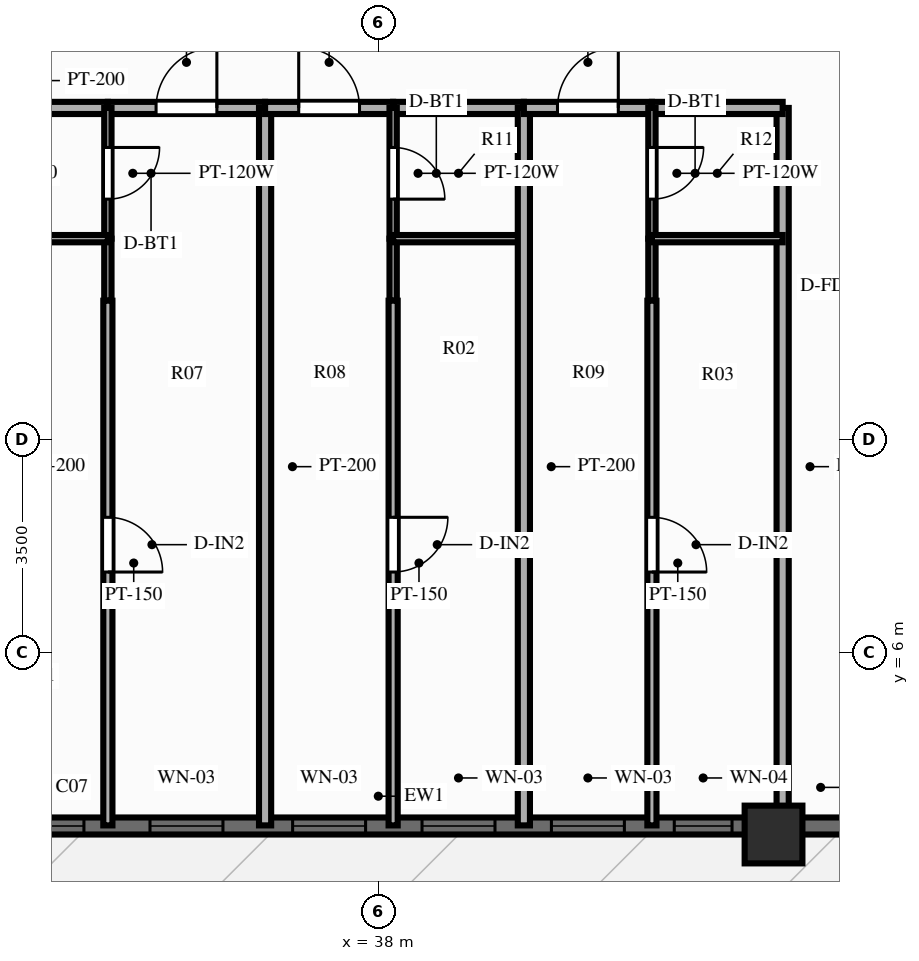
"""IFC4 building model, lengths in metres.
Left out: names, types, materials, properties, quantities, classifications, styles, units other than length and angle.
Written with IfcOpenShell. Run it as: python <this file> out.ifc"""

import sys

from ifc_helpers import new_model, si_unit, direction, frame, frame_2d, origin, origin_2d, place, context, subcontext, project, spatial, rectangle, extrude, source, transform, mapped, element, fill, save


model = new_model("IFC4")
c1 = context("Model", 3, precision=1e-05, world=origin(), true_north=direction((0.0, 1.0)))
c2 = subcontext(c1, "Body", "Model", "MODEL_VIEW")
j1 = project(units=[si_unit("LENGTHUNIT", "METRE"), si_unit("PLANEANGLEUNIT", "RADIAN")], contexts=[c1])
p1 = place(None, origin())
s1 = spatial("IfcSite", under=j1, at=p1, CompositionType="ELEMENT")
p2 = place(p1, origin())
s2 = spatial("IfcBuilding", under=s1, at=p2, CompositionType="ELEMENT")
p3 = place(p2, frame((0.0, 0.0, 110.85)))
s3 = spatial("IfcBuildingStorey", under=s2, at=p3, CompositionType="ELEMENT", Elevation=110.85)
m1 = source(origin(), c2, "Body", "SweptSolid", [
    extrude(rectangle(XDim=0.95, YDim=0.95, at=origin_2d()), origin(), (0.0, 0.0, 1.0), 3.0),
])
p4 = place(p3, frame((44.5, 3.0, 0.0), z_axis=(0.0, 0.0, 1.0), x_axis=(1.0, 0.0, 0.0)))
e1 = element("IfcColumn", 1, at=p4, inside=s3, PredefinedType="COLUMN", context=c2, shape_type="MappedRepresentation", body=[
    mapped(m1, transform((0.0, 0.0, 0.0), scale=1.0)),
])
p5 = place(p3, frame((16.2, 3.14, 0.0), z_axis=(0.0, 0.0, 1.0), x_axis=(1.0, 0.0, 0.0)))
e2 = element("IfcWall", 2, at=p5, inside=s3, PredefinedType="SOLIDWALL", context=c2, shape_type="SweptSolid", body=[
    extrude(rectangle(XDim=43.6, YDim=0.28, at=frame_2d((21.8, 0.0))), origin(), (0.0, 0.0, 1.0), 2.28),
])
p6 = place(p5, frame((8.2, 0.0, 0.0), z_axis=(0.0, 0.0, 1.0), x_axis=(-1.0, 0.0, 0.0)))
e3 = element("IfcOpeningElement", 3, at=p6, cuts=e2, PredefinedType="OPENING", context=c2, shape_type="SweptSolid", body=[
    extrude(rectangle(XDim=1.1, YDim=2.15, at=frame_2d((0.55, 1.075))), frame((0.0, 0.152, 0.0), z_axis=(0.0, -1.0, 0.0), x_axis=(1.0, 0.0, 0.0)), (0.0, 0.0, 1.0), 0.304),
])
p7 = place(p5, frame((16.009, 0.0, 0.25)))
e4 = element("IfcOpeningElement", 4, at=p7, cuts=e2, PredefinedType="OPENING", context=c2, shape_type="SweptSolid", body=[
    extrude(rectangle(XDim=0.95, YDim=1.5, at=frame_2d((0.475, 0.75))), frame((0.0, 0.152, 0.0), z_axis=(0.0, -1.0, 0.0), x_axis=(1.0, 0.0, 0.0)), (0.0, 0.0, 1.0), 0.304),
])
p8 = place(p5, frame((18.045, 0.0, 0.25)))
e5 = element("IfcOpeningElement", 5, at=p8, cuts=e2, PredefinedType="OPENING", context=c2, shape_type="SweptSolid", body=[
    extrude(rectangle(XDim=1.2, YDim=1.5, at=frame_2d((0.6, 0.75))), frame((0.0, 0.152, 0.0), z_axis=(0.0, -1.0, 0.0), x_axis=(1.0, 0.0, 0.0)), (0.0, 0.0, 1.0), 0.304),
])
p9 = place(p5, frame((20.391, 0.0, 0.25)))
e6 = element("IfcOpeningElement", 6, at=p9, cuts=e2, PredefinedType="OPENING", context=c2, shape_type="SweptSolid", body=[
    extrude(rectangle(XDim=1.2, YDim=1.5, at=frame_2d((0.6, 0.75))), frame((0.0, 0.152, 0.0), z_axis=(0.0, -1.0, 0.0), x_axis=(1.0, 0.0, 0.0)), (0.0, 0.0, 1.0), 0.304),
])
p10 = place(p5, frame((22.519, 0.0, 0.25)))
e7 = element("IfcOpeningElement", 7, at=p10, cuts=e2, PredefinedType="OPENING", context=c2, shape_type="SweptSolid", body=[
    extrude(rectangle(XDim=1.2, YDim=1.5, at=frame_2d((0.6, 0.75))), frame((0.0, 0.152, 0.0), z_axis=(0.0, -1.0, 0.0), x_axis=(1.0, 0.0, 0.0)), (0.0, 0.0, 1.0), 0.304),
])
p11 = place(p5, frame((24.647, 0.0, 0.25)))
e8 = element("IfcOpeningElement", 8, at=p11, cuts=e2, PredefinedType="OPENING", context=c2, shape_type="SweptSolid", body=[
    extrude(rectangle(XDim=1.2, YDim=1.5, at=frame_2d((0.6, 0.75))), frame((0.0, 0.152, 0.0), z_axis=(0.0, -1.0, 0.0), x_axis=(1.0, 0.0, 0.0)), (0.0, 0.0, 1.0), 0.304),
])
p12 = place(p5, frame((26.667, 0.0, 0.25)))
e9 = element("IfcOpeningElement", 9, at=p12, cuts=e2, PredefinedType="OPENING", context=c2, shape_type="SweptSolid", body=[
    extrude(rectangle(XDim=0.95, YDim=1.5, at=frame_2d((0.475, 0.75))), frame((0.0, 0.152, 0.0), z_axis=(0.0, -1.0, 0.0), x_axis=(1.0, 0.0, 0.0)), (0.0, 0.0, 1.0), 0.304),
])
p13 = place(p5, frame((35.35, 0.0, 0.25)))
e10 = element("IfcOpeningElement", 10, at=p13, cuts=e2, PredefinedType="OPENING", context=c2, shape_type="SweptSolid", body=[
    extrude(rectangle(XDim=1.2, YDim=1.5, at=frame_2d((0.6, 0.75))), frame((0.0, 0.152, 0.0), z_axis=(0.0, -1.0, 0.0), x_axis=(1.0, 0.0, 0.0)), (0.0, 0.0, 1.0), 0.304),
])
p14 = place(p3, frame((44.65, 14.95, 0.0), z_axis=(0.0, 0.0, 1.0), x_axis=(0.0, -1.0, 0.0)))
e11 = element("IfcWall", 11, at=p14, inside=s3, PredefinedType="PARTITIONING", context=c2, shape_type="SweptSolid", body=[
    extrude(rectangle(XDim=11.8, YDim=0.2, at=frame_2d((5.9, 0.0))), origin(), (0.0, 0.0, 1.0), 2.34),
])
p15 = place(p3, frame((31.35, 14.95, 0.0), z_axis=(0.0, 0.0, 1.0), x_axis=(1.0, 0.0, 0.0)))
e12 = element("IfcWall", 12, at=p15, inside=s3, PredefinedType="PARTITIONING", context=c2, shape_type="SweptSolid", body=[
    extrude(rectangle(XDim=2.202, YDim=0.2, at=frame_2d((1.101, 0.0))), origin(), (0.0, 0.0, 1.0), 2.79),
])
p16 = place(p3, frame((33.552, 14.95, 0.0), z_axis=(0.0, 0.0, 1.0), x_axis=(1.0, 0.0, 0.0)))
e13 = element("IfcWall", 13, at=p16, inside=s3, PredefinedType="PARTITIONING", context=c2, shape_type="SweptSolid", body=[
    extrude(rectangle(XDim=2.585, YDim=0.2, at=frame_2d((1.293, 0.0))), origin(), (0.0, 0.0, 1.0), 2.79),
])
p17 = place(p16, frame((0.793, 0.0, 0.0)))
e14 = element("IfcOpeningElement", 14, at=p17, cuts=e13, PredefinedType="OPENING", context=c2, shape_type="SweptSolid", body=[
    extrude(rectangle(XDim=1.0, YDim=2.15, at=frame_2d((0.5, 1.075))), frame((0.0, 0.112, 0.0), z_axis=(0.0, -1.0, 0.0), x_axis=(1.0, 0.0, 0.0)), (0.0, 0.0, 1.0), 0.224),
])
p18 = place(p3, frame((33.552, 14.95, 0.0), z_axis=(0.0, 0.0, 1.0), x_axis=(0.0, -1.0, 0.0)))
e15 = element("IfcWall", 15, at=p18, inside=s3, PredefinedType="PARTITIONING", context=c2, shape_type="SweptSolid", body=[
    extrude(rectangle(XDim=2.15, YDim=0.12, at=frame_2d((1.075, 0.0))), origin(), (0.0, 0.0, 1.0), 2.79),
])
p19 = place(p18, frame((0.65, 0.0, 0.0)))
e16 = element("IfcOpeningElement", 16, at=p19, cuts=e15, PredefinedType="OPENING", context=c2, shape_type="SweptSolid", body=[
    extrude(rectangle(XDim=0.85, YDim=2.05, at=frame_2d((0.425, 1.025))), frame((0.0, 0.072, 0.0), z_axis=(0.0, -1.0, 0.0), x_axis=(1.0, 0.0, 0.0)), (0.0, 0.0, 1.0), 0.144),
])
p20 = place(p3, frame((33.552, 12.8, 0.0), z_axis=(0.0, 0.0, 1.0), x_axis=(0.0, -1.0, 0.0)))
e17 = element("IfcWall", 17, at=p20, inside=s3, PredefinedType="PARTITIONING", context=c2, shape_type="SweptSolid", body=[
    extrude(rectangle(XDim=1.02, YDim=0.12, at=frame_2d((0.51, 0.0))), origin(), (0.0, 0.0, 1.0), 2.79),
])
p21 = place(p3, frame((31.35, 12.8, 0.0), z_axis=(0.0, 0.0, 1.0), x_axis=(1.0, 0.0, 0.0)))
e18 = element("IfcWall", 18, at=p21, inside=s3, PredefinedType="PARTITIONING", context=c2, shape_type="SweptSolid", body=[
    extrude(rectangle(XDim=2.202, YDim=0.12, at=frame_2d((1.101, 0.0))), origin(), (0.0, 0.0, 1.0), 2.79),
])
p22 = place(p3, frame((33.552, 11.78, 0.0), z_axis=(0.0, 0.0, 1.0), x_axis=(0.0, -1.0, 0.0)))
e19 = element("IfcWall", 19, at=p22, inside=s3, PredefinedType="PARTITIONING", context=c2, shape_type="SweptSolid", body=[
    extrude(rectangle(XDim=8.63, YDim=0.15, at=frame_2d((4.315, 0.0))), origin(), (0.0, 0.0, 1.0), 2.79),
])
p23 = place(p22, frame((3.563, 0.0, 0.0)))
e20 = element("IfcOpeningElement", 20, at=p23, cuts=e19, PredefinedType="OPENING", context=c2, shape_type="SweptSolid", body=[
    extrude(rectangle(XDim=0.9, YDim=2.1, at=frame_2d((0.45, 1.05))), frame((0.0, 0.087, 0.0), z_axis=(0.0, -1.0, 0.0), x_axis=(1.0, 0.0, 0.0)), (0.0, 0.0, 1.0), 0.174),
])
p24 = place(p3, frame((36.138, 14.95, 0.0), z_axis=(0.0, 0.0, 1.0), x_axis=(0.0, -1.0, 0.0)))
e21 = element("IfcWall", 21, at=p24, inside=s3, PredefinedType="PARTITIONING", context=c2, shape_type="SweptSolid", body=[
    extrude(rectangle(XDim=11.8, YDim=0.2, at=frame_2d((5.9, 0.0))), origin(), (0.0, 0.0, 1.0), 2.79),
])
p25 = place(p3, frame((36.138, 14.95, 0.0), z_axis=(0.0, 0.0, 1.0), x_axis=(1.0, 0.0, 0.0)))
e22 = element("IfcWall", 22, at=p25, inside=s3, PredefinedType="PARTITIONING", context=c2, shape_type="SweptSolid", body=[
    extrude(rectangle(XDim=2.106, YDim=0.2, at=frame_2d((1.053, 0.0))), origin(), (0.0, 0.0, 1.0), 2.79),
])
p26 = place(p25, frame((0.553, 0.0, 0.0)))
e23 = element("IfcOpeningElement", 23, at=p26, cuts=e22, PredefinedType="OPENING", context=c2, shape_type="SweptSolid", body=[
    extrude(rectangle(XDim=1.0, YDim=2.15, at=frame_2d((0.5, 1.075))), frame((0.0, 0.112, 0.0), z_axis=(0.0, -1.0, 0.0), x_axis=(1.0, 0.0, 0.0)), (0.0, 0.0, 1.0), 0.224),
])
p27 = place(p3, frame((38.244, 14.95, 0.0), z_axis=(0.0, 0.0, 1.0), x_axis=(1.0, 0.0, 0.0)))
e24 = element("IfcWall", 24, at=p27, inside=s3, PredefinedType="PARTITIONING", context=c2, shape_type="SweptSolid", body=[
    extrude(rectangle(XDim=2.15, YDim=0.2, at=frame_2d((1.075, 0.0))), origin(), (0.0, 0.0, 1.0), 2.79),
])
p28 = place(p3, frame((38.244, 14.95, 0.0), z_axis=(0.0, 0.0, 1.0), x_axis=(0.0, -1.0, 0.0)))
e25 = element("IfcWall", 25, at=p28, inside=s3, PredefinedType="PARTITIONING", context=c2, shape_type="SweptSolid", body=[
    extrude(rectangle(XDim=2.15, YDim=0.12, at=frame_2d((1.075, 0.0))), origin(), (0.0, 0.0, 1.0), 2.79),
])
p29 = place(p28, frame((0.65, 0.0, 0.0)))
e26 = element("IfcOpeningElement", 26, at=p29, cuts=e25, PredefinedType="OPENING", context=c2, shape_type="SweptSolid", body=[
    extrude(rectangle(XDim=0.85, YDim=2.05, at=frame_2d((0.425, 1.025))), frame((0.0, 0.072, 0.0), z_axis=(0.0, -1.0, 0.0), x_axis=(1.0, 0.0, 0.0)), (0.0, 0.0, 1.0), 0.144),
])
p30 = place(p3, frame((38.244, 12.8, 0.0), z_axis=(0.0, 0.0, 1.0), x_axis=(0.0, -1.0, 0.0)))
e27 = element("IfcWall", 27, at=p30, inside=s3, PredefinedType="PARTITIONING", context=c2, shape_type="SweptSolid", body=[
    extrude(rectangle(XDim=1.02, YDim=0.12, at=frame_2d((0.51, 0.0))), origin(), (0.0, 0.0, 1.0), 2.79),
])
p31 = place(p3, frame((38.244, 12.8, 0.0), z_axis=(0.0, 0.0, 1.0), x_axis=(1.0, 0.0, 0.0)))
e28 = element("IfcWall", 28, at=p31, inside=s3, PredefinedType="PARTITIONING", context=c2, shape_type="SweptSolid", body=[
    extrude(rectangle(XDim=2.15, YDim=0.12, at=frame_2d((1.075, 0.0))), origin(), (0.0, 0.0, 1.0), 2.79),
])
p32 = place(p3, frame((38.244, 11.78, 0.0), z_axis=(0.0, 0.0, 1.0), x_axis=(0.0, -1.0, 0.0)))
e29 = element("IfcWall", 29, at=p32, inside=s3, PredefinedType="PARTITIONING", context=c2, shape_type="SweptSolid", body=[
    extrude(rectangle(XDim=8.63, YDim=0.15, at=frame_2d((4.315, 0.0))), origin(), (0.0, 0.0, 1.0), 2.79),
])
p33 = place(p32, frame((3.563, 0.0, 0.0)))
e30 = element("IfcOpeningElement", 30, at=p33, cuts=e29, PredefinedType="OPENING", context=c2, shape_type="SweptSolid", body=[
    extrude(rectangle(XDim=0.9, YDim=2.1, at=frame_2d((0.45, 1.05))), frame((0.0, 0.087, 0.0), z_axis=(0.0, -1.0, 0.0), x_axis=(1.0, 0.0, 0.0)), (0.0, 0.0, 1.0), 0.174),
])
p34 = place(p3, frame((40.394, 14.95, 0.0), z_axis=(0.0, 0.0, 1.0), x_axis=(0.0, -1.0, 0.0)))
e31 = element("IfcWall", 31, at=p34, inside=s3, PredefinedType="PARTITIONING", context=c2, shape_type="SweptSolid", body=[
    extrude(rectangle(XDim=11.8, YDim=0.2, at=frame_2d((5.9, 0.0))), origin(), (0.0, 0.0, 1.0), 2.79),
])
p35 = place(p3, frame((40.394, 14.95, 0.0), z_axis=(0.0, 0.0, 1.0), x_axis=(1.0, 0.0, 0.0)))
e32 = element("IfcWall", 32, at=p35, inside=s3, PredefinedType="PARTITIONING", context=c2, shape_type="SweptSolid", body=[
    extrude(rectangle(XDim=2.106, YDim=0.2, at=frame_2d((1.053, 0.0))), origin(), (0.0, 0.0, 1.0), 2.79),
])
p36 = place(p35, frame((0.553, 0.0, 0.0)))
e33 = element("IfcOpeningElement", 33, at=p36, cuts=e32, PredefinedType="OPENING", context=c2, shape_type="SweptSolid", body=[
    extrude(rectangle(XDim=1.0, YDim=2.15, at=frame_2d((0.5, 1.075))), frame((0.0, 0.112, 0.0), z_axis=(0.0, -1.0, 0.0), x_axis=(1.0, 0.0, 0.0)), (0.0, 0.0, 1.0), 0.224),
])
p37 = place(p3, frame((42.5, 14.95, 0.0), z_axis=(0.0, 0.0, 1.0), x_axis=(1.0, 0.0, 0.0)))
e34 = element("IfcWall", 34, at=p37, inside=s3, PredefinedType="PARTITIONING", context=c2, shape_type="SweptSolid", body=[
    extrude(rectangle(XDim=2.15, YDim=0.2, at=frame_2d((1.075, 0.0))), origin(), (0.0, 0.0, 1.0), 2.79),
])
p38 = place(p3, frame((42.5, 14.95, 0.0), z_axis=(0.0, 0.0, 1.0), x_axis=(0.0, -1.0, 0.0)))
e35 = element("IfcWall", 35, at=p38, inside=s3, PredefinedType="PARTITIONING", context=c2, shape_type="SweptSolid", body=[
    extrude(rectangle(XDim=2.15, YDim=0.12, at=frame_2d((1.075, 0.0))), origin(), (0.0, 0.0, 1.0), 2.79),
])
p39 = place(p38, frame((0.65, 0.0, 0.0)))
e36 = element("IfcOpeningElement", 36, at=p39, cuts=e35, PredefinedType="OPENING", context=c2, shape_type="SweptSolid", body=[
    extrude(rectangle(XDim=0.85, YDim=2.05, at=frame_2d((0.425, 1.025))), frame((0.0, 0.072, 0.0), z_axis=(0.0, -1.0, 0.0), x_axis=(1.0, 0.0, 0.0)), (0.0, 0.0, 1.0), 0.144),
])
p40 = place(p3, frame((42.5, 12.8, 0.0), z_axis=(0.0, 0.0, 1.0), x_axis=(0.0, -1.0, 0.0)))
e37 = element("IfcWall", 37, at=p40, inside=s3, PredefinedType="PARTITIONING", context=c2, shape_type="SweptSolid", body=[
    extrude(rectangle(XDim=1.02, YDim=0.12, at=frame_2d((0.51, 0.0))), origin(), (0.0, 0.0, 1.0), 2.79),
])
p41 = place(p3, frame((42.5, 12.8, 0.0), z_axis=(0.0, 0.0, 1.0), x_axis=(1.0, 0.0, 0.0)))
e38 = element("IfcWall", 38, at=p41, inside=s3, PredefinedType="PARTITIONING", context=c2, shape_type="SweptSolid", body=[
    extrude(rectangle(XDim=2.15, YDim=0.12, at=frame_2d((1.075, 0.0))), origin(), (0.0, 0.0, 1.0), 2.79),
])
p42 = place(p3, frame((42.5, 11.78, 0.0), z_axis=(0.0, 0.0, 1.0), x_axis=(0.0, -1.0, 0.0)))
e39 = element("IfcWall", 39, at=p42, inside=s3, PredefinedType="PARTITIONING", context=c2, shape_type="SweptSolid", body=[
    extrude(rectangle(XDim=8.63, YDim=0.15, at=frame_2d((4.315, 0.0))), origin(), (0.0, 0.0, 1.0), 2.79),
])
p43 = place(p42, frame((3.563, 0.0, 0.0)))
e40 = element("IfcOpeningElement", 40, at=p43, cuts=e39, PredefinedType="OPENING", context=c2, shape_type="SweptSolid", body=[
    extrude(rectangle(XDim=0.9, YDim=2.1, at=frame_2d((0.45, 1.05))), frame((0.0, 0.087, 0.0), z_axis=(0.0, -1.0, 0.0), x_axis=(1.0, 0.0, 0.0)), (0.0, 0.0, 1.0), 0.174),
])
m2 = source(origin(), c2, "Body", "SweptSolid", [
    extrude(rectangle(XDim=0.95, YDim=1.5, at=frame_2d((0.475, 0.75))), frame((0.0, 0.03, 0.0), z_axis=(0.0, -1.0, 0.0), x_axis=(1.0, 0.0, 0.0)), (0.0, 0.0, 1.0), 0.06),
])
p44 = place(p7, origin())
e41 = element("IfcWindow", 41, at=p44, inside=s3, PartitioningType="SINGLE_PANEL", PredefinedType="WINDOW", context=c2, shape_type="MappedRepresentation", body=[
    mapped(m2, transform((0.0, 0.0, 0.0), scale=1.0)),
])
fill(e4, e41)
m3 = source(origin(), c2, "Body", "SweptSolid", [
    extrude(rectangle(XDim=1.2, YDim=1.5, at=frame_2d((0.6, 0.75))), frame((0.0, 0.03, 0.0), z_axis=(0.0, -1.0, 0.0), x_axis=(1.0, 0.0, 0.0)), (0.0, 0.0, 1.0), 0.06),
])
p45 = place(p8, origin())
e42 = element("IfcWindow", 42, at=p45, inside=s3, PartitioningType="SINGLE_PANEL", PredefinedType="WINDOW", context=c2, shape_type="MappedRepresentation", body=[
    mapped(m3, transform((0.0, 0.0, 0.0), scale=1.0)),
])
fill(e5, e42)
p46 = place(p9, origin())
e43 = element("IfcWindow", 43, at=p46, inside=s3, PartitioningType="SINGLE_PANEL", PredefinedType="WINDOW", context=c2, shape_type="MappedRepresentation", body=[
    mapped(m3, transform((0.0, 0.0, 0.0), scale=1.0)),
])
fill(e6, e43)
p47 = place(p10, origin())
e44 = element("IfcWindow", 44, at=p47, inside=s3, PartitioningType="SINGLE_PANEL", PredefinedType="WINDOW", context=c2, shape_type="MappedRepresentation", body=[
    mapped(m3, transform((0.0, 0.0, 0.0), scale=1.0)),
])
fill(e7, e44)
p48 = place(p11, origin())
e45 = element("IfcWindow", 45, at=p48, inside=s3, PartitioningType="SINGLE_PANEL", PredefinedType="WINDOW", context=c2, shape_type="MappedRepresentation", body=[
    mapped(m3, transform((0.0, 0.0, 0.0), scale=1.0)),
])
fill(e8, e45)
p49 = place(p12, origin())
e46 = element("IfcWindow", 46, at=p49, inside=s3, PartitioningType="SINGLE_PANEL", PredefinedType="WINDOW", context=c2, shape_type="MappedRepresentation", body=[
    mapped(m2, transform((0.0, 0.0, 0.0), scale=1.0)),
])
fill(e9, e46)
m4 = source(origin(), c2, "Body", "SweptSolid", [
    extrude(rectangle(XDim=1.0, YDim=2.15, at=frame_2d((0.5, 1.075))), frame((0.0, 0.025, 0.0), z_axis=(0.0, -1.0, 0.0), x_axis=(1.0, 0.0, 0.0)), (0.0, 0.0, 1.0), 0.05),
])
p50 = place(p17, origin())
e47 = element("IfcDoor", 47, at=p50, inside=s3, OperationType="SINGLE_SWING_RIGHT", PredefinedType="DOOR", context=c2, shape_type="MappedRepresentation", body=[
    mapped(m4, transform((0.0, 0.0, 0.0), scale=1.0)),
])
fill(e14, e47)
m5 = source(origin(), c2, "Body", "SweptSolid", [
    extrude(rectangle(XDim=0.85, YDim=2.05, at=frame_2d((0.425, 1.025))), frame((0.0, 0.025, 0.0), z_axis=(0.0, -1.0, 0.0), x_axis=(1.0, 0.0, 0.0)), (0.0, 0.0, 1.0), 0.05),
])
p51 = place(p19, origin())
e48 = element("IfcDoor", 48, at=p51, inside=s3, OperationType="SINGLE_SWING_LEFT", PredefinedType="DOOR", context=c2, shape_type="MappedRepresentation", body=[
    mapped(m5, transform((0.0, 0.0, 0.0), scale=1.0)),
])
fill(e16, e48)
m6 = source(origin(), c2, "Body", "SweptSolid", [
    extrude(rectangle(XDim=0.9, YDim=2.1, at=frame_2d((0.45, 1.05))), frame((0.0, 0.025, 0.0), z_axis=(0.0, -1.0, 0.0), x_axis=(1.0, 0.0, 0.0)), (0.0, 0.0, 1.0), 0.05),
])
p52 = place(p23, origin())
e49 = element("IfcDoor", 49, at=p52, inside=s3, OperationType="SINGLE_SWING_RIGHT", PredefinedType="DOOR", context=c2, shape_type="MappedRepresentation", body=[
    mapped(m6, transform((0.0, 0.0, 0.0), scale=1.0)),
])
fill(e20, e49)
p53 = place(p26, origin())
e50 = element("IfcDoor", 50, at=p53, inside=s3, OperationType="SINGLE_SWING_LEFT", PredefinedType="DOOR", context=c2, shape_type="MappedRepresentation", body=[
    mapped(m4, transform((0.0, 0.0, 0.0), scale=1.0)),
])
fill(e23, e50)
p54 = place(p29, origin())
e51 = element("IfcDoor", 51, at=p54, inside=s3, OperationType="SINGLE_SWING_RIGHT", PredefinedType="DOOR", context=c2, shape_type="MappedRepresentation", body=[
    mapped(m5, transform((0.0, 0.0, 0.0), scale=1.0)),
])
fill(e26, e51)
p55 = place(p33, origin())
e52 = element("IfcDoor", 52, at=p55, inside=s3, OperationType="SINGLE_SWING_LEFT", PredefinedType="DOOR", context=c2, shape_type="MappedRepresentation", body=[
    mapped(m6, transform((0.0, 0.0, 0.0), scale=1.0)),
])
fill(e30, e52)
p56 = place(p36, origin())
e53 = element("IfcDoor", 53, at=p56, inside=s3, OperationType="SINGLE_SWING_RIGHT", PredefinedType="DOOR", context=c2, shape_type="MappedRepresentation", body=[
    mapped(m4, transform((0.0, 0.0, 0.0), scale=1.0)),
])
fill(e33, e53)
p57 = place(p39, origin())
e54 = element("IfcDoor", 54, at=p57, inside=s3, OperationType="SINGLE_SWING_LEFT", PredefinedType="DOOR", context=c2, shape_type="MappedRepresentation", body=[
    mapped(m5, transform((0.0, 0.0, 0.0), scale=1.0)),
])
fill(e36, e54)
p58 = place(p43, origin())
e55 = element("IfcDoor", 55, at=p58, inside=s3, OperationType="SINGLE_SWING_RIGHT", PredefinedType="DOOR", context=c2, shape_type="MappedRepresentation", body=[
    mapped(m6, transform((0.0, 0.0, 0.0), scale=1.0)),
])
fill(e40, e55)
save(model, sys.argv[1])
